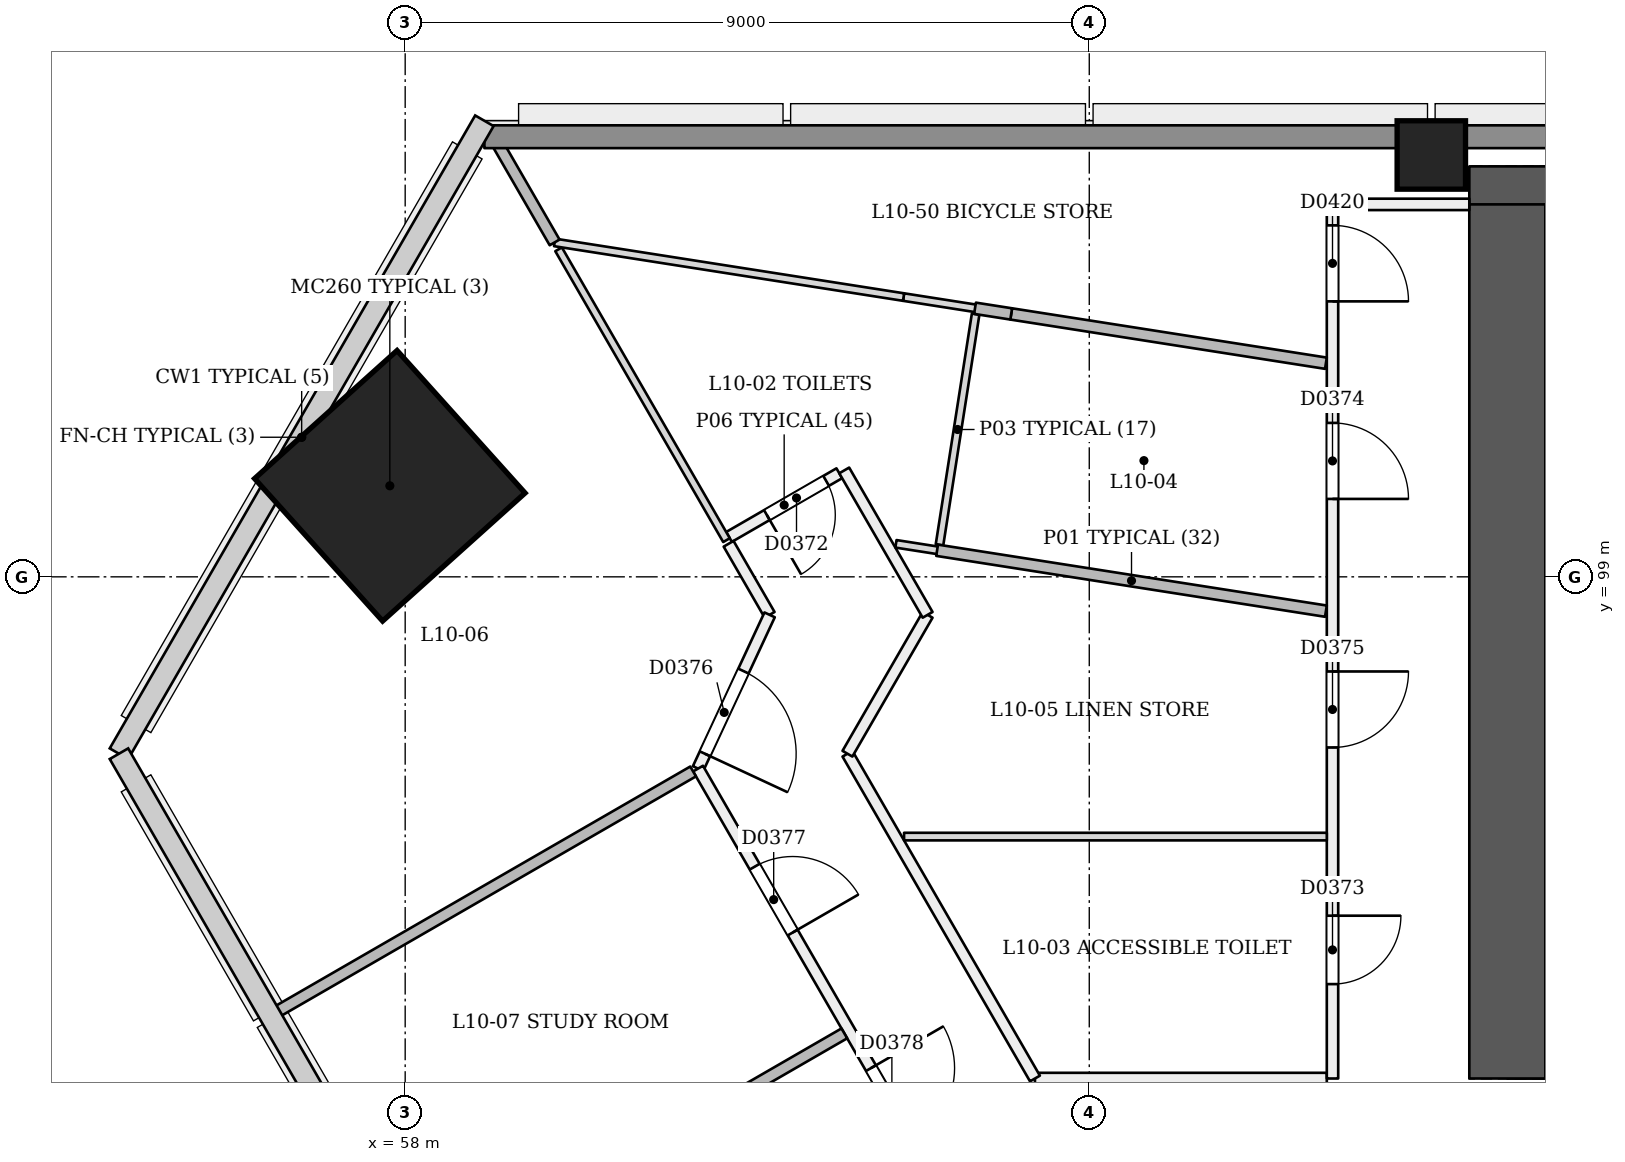
"""IFC4 building model, lengths in metres.
Left out: names, types, materials, properties, quantities, classifications, styles, units other than length and angle.
Written with IfcOpenShell. Run it as: python <this file> out.ifc"""

import sys

from ifc_helpers import new_model, si_unit, direction, frame, frame_2d, origin, origin_2d, place, context, subcontext, project, spatial, rectangle, extrude, element, fill, save


model = new_model("IFC4")
c1 = context("Model", 3, precision=1e-05, world=origin(), true_north=direction((0.0, 1.0)))
c2 = subcontext(c1, "Body", "Model", "MODEL_VIEW")
j1 = project(units=[si_unit("LENGTHUNIT", "METRE"), si_unit("PLANEANGLEUNIT", "RADIAN")], contexts=[c1])
p1 = place(None, origin())
s1 = spatial("IfcSite", under=j1, at=p1, CompositionType="ELEMENT")
p2 = place(p1, origin())
s2 = spatial("IfcBuilding", under=s1, at=p2, CompositionType="ELEMENT")
p3 = place(p2, frame((0.0, 0.0, 45.0)))
s3 = spatial("IfcBuildingStorey", under=s2, at=p3, CompositionType="ELEMENT", Elevation=45.0)
p4 = place(p3, frame((72.5, 92.9, 0.0), z_axis=(0.0, 0.0, 1.0), x_axis=(1.0, 0.0, 0.0)))
e1 = element("IfcWall", 1, at=p4, inside=s3, PredefinedType="SHEAR", context=c2, shape_type="SweptSolid", body=[
    extrude(rectangle(XDim=25.5, YDim=1.0, at=frame_2d((12.75, 0.0))), origin(), (0.0, 0.0, 1.0), 3.6),
])
p5 = place(p4, frame((1.3, 0.0, 0.0)))
e2 = element("IfcOpeningElement", 2, at=p5, cuts=e1, PredefinedType="OPENING", context=c2, shape_type="SweptSolid", body=[
    extrude(rectangle(XDim=1.2, YDim=2.1, at=frame_2d((0.6, 1.05))), frame((0.0, 0.51, 0.0), z_axis=(0.0, -1.0, 0.0), x_axis=(1.0, 0.0, 0.0)), (0.0, 0.0, 1.0), 1.021),
])
p6 = place(p4, frame((3.5, 0.0, 0.0)))
e3 = element("IfcOpeningElement", 3, at=p6, cuts=e1, PredefinedType="OPENING", context=c2, shape_type="SweptSolid", body=[
    extrude(rectangle(XDim=1.2, YDim=2.1, at=frame_2d((0.6, 1.05))), frame((0.0, 0.51, 0.0), z_axis=(0.0, -1.0, 0.0), x_axis=(1.0, 0.0, 0.0)), (0.0, 0.0, 1.0), 1.021),
])
p7 = place(p4, frame((13.5, 0.0, 0.0)))
e4 = element("IfcOpeningElement", 4, at=p7, cuts=e1, PredefinedType="OPENING", context=c2, shape_type="SweptSolid", body=[
    extrude(rectangle(XDim=1.2, YDim=2.1, at=frame_2d((0.6, 1.05))), frame((0.0, 0.51, 0.0), z_axis=(0.0, -1.0, 0.0), x_axis=(1.0, 0.0, 0.0)), (0.0, 0.0, 1.0), 1.021),
])
p8 = place(p4, frame((16.913, 0.0, 0.0)))
e5 = element("IfcOpeningElement", 5, at=p8, cuts=e1, PredefinedType="OPENING", context=c2, shape_type="SweptSolid", body=[
    extrude(rectangle(XDim=1.0, YDim=2.1, at=frame_2d((0.5, 1.05))), frame((0.0, 0.51, 0.0), z_axis=(0.0, -1.0, 0.0), x_axis=(1.0, 0.0, 0.0)), (0.0, 0.0, 1.0), 1.021),
])
p9 = place(p4, frame((20.8, 0.0, 0.0)))
e6 = element("IfcOpeningElement", 6, at=p9, cuts=e1, PredefinedType="OPENING", context=c2, shape_type="SweptSolid", body=[
    extrude(rectangle(XDim=1.0, YDim=2.1, at=frame_2d((0.5, 1.05))), frame((0.0, 0.51, 0.0), z_axis=(0.0, -1.0, 0.0), x_axis=(1.0, 0.0, 0.0)), (0.0, 0.0, 1.0), 1.021),
])
p10 = place(p4, frame((23.238, 0.0, 0.0)))
e7 = element("IfcOpeningElement", 7, at=p10, cuts=e1, PredefinedType="OPENING", context=c2, shape_type="SweptSolid", body=[
    extrude(rectangle(XDim=1.0, YDim=2.1, at=frame_2d((0.5, 1.05))), frame((0.0, 0.51, 0.0), z_axis=(0.0, -1.0, 0.0), x_axis=(1.0, 0.0, 0.0)), (0.0, 0.0, 1.0), 1.021),
])
p11 = place(p3, frame((97.5, 103.9, 0.0), z_axis=(0.0, 0.0, 1.0), x_axis=(-1.0, 0.0, 0.0)))
e8 = element("IfcWall", 8, at=p11, inside=s3, PredefinedType="SHEAR", context=c2, shape_type="SweptSolid", body=[
    extrude(rectangle(XDim=25.5, YDim=1.0, at=frame_2d((12.75, 0.0))), origin(), (0.0, 0.0, 1.0), 3.6),
])
p12 = place(p3, frame((72.5, 103.9, 0.0), z_axis=(0.0, 0.0, 1.0), x_axis=(0.0, -1.0, 0.0)))
e9 = element("IfcWall", 9, at=p12, inside=s3, PredefinedType="SHEAR", context=c2, shape_type="SweptSolid", body=[
    extrude(rectangle(XDim=11.5, YDim=1.0, at=frame_2d((5.75, 0.0))), origin(), (0.0, 0.0, 1.0), 3.6),
])
p13 = place(p3, frame((57.764, 100.187, 0.0), z_axis=(0.028401814599, 0.009218727412, 0.999554076572), x_axis=(-0.865122998738, 0.501162448814, 0.019959883591)))
e10 = element("IfcColumn", 10, at=p13, inside=s3, PredefinedType="COLUMN", context=c2, shape_type="SweptSolid", body=[
    extrude(rectangle(XDim=2.52, YDim=2.52, at=origin_2d()), origin(), (0.0, 0.0, 1.0), 3.602),
])
p14 = place(p3, frame((71.5, 104.55, 0.0), z_axis=(0.0, 0.0, 1.0), x_axis=(1.0, 0.0, 0.0)))
e11 = element("IfcColumn", 11, at=p14, inside=s3, PredefinedType="COLUMN", context=c2, shape_type="SweptSolid", body=[
    extrude(rectangle(XDim=0.9, YDim=0.9, at=origin_2d()), origin(), (0.0, 0.0, 1.0), 3.6),
])
p15 = place(p3, frame((63.711, 100.363, 0.0), z_axis=(0.0, 0.0, 1.0), x_axis=(-0.865964676353, -0.500105168249, 0.0)))
e12 = element("IfcWall", 12, at=p15, inside=s3, PredefinedType="PARTITIONING", context=c2, shape_type="SweptSolid", body=[
    extrude(rectangle(XDim=1.675, YDim=0.15, at=frame_2d((0.837, 0.0))), origin(), (0.0, 0.0, 1.0), 3.1),
])
p16 = place(p15, frame((0.2, 0.0, 0.0)))
e13 = element("IfcOpeningElement", 13, at=p16, cuts=e12, PredefinedType="OPENING", context=c2, shape_type="SweptSolid", body=[
    extrude(rectangle(XDim=0.9, YDim=2.1, at=frame_2d((0.45, 1.05))), frame((0.0, 0.085, 0.0), z_axis=(0.0, -1.0, 0.0), x_axis=(1.0, 0.0, 0.0)), (0.0, 0.0, 1.0), 0.171),
])
p17 = place(p3, frame((70.125, 92.4, 0.0), z_axis=(0.0, 0.0, 1.0), x_axis=(-1.0, 0.0, 0.0)))
e14 = element("IfcWall", 14, at=p17, inside=s3, PredefinedType="PARTITIONING", context=c2, shape_type="SweptSolid", body=[
    extrude(rectangle(XDim=3.84, YDim=0.15, at=frame_2d((1.92, 0.0))), origin(), (0.0, 0.0, 1.0), 3.1),
])
p18 = place(p3, frame((66.285, 92.4, 0.0), z_axis=(0.0, 0.0, 1.0), x_axis=(-0.499986575203, 0.866033154456, 0.0)))
e15 = element("IfcWall", 15, at=p18, inside=s3, PredefinedType="PARTITIONING", context=c2, shape_type="SweptSolid", body=[
    extrude(rectangle(XDim=4.934, YDim=0.15, at=frame_2d((2.467, 0.0))), origin(), (0.0, 0.0, 1.0), 3.1),
])
p19 = place(p3, frame((70.2, 103.9, 0.0), z_axis=(0.0, 0.0, 1.0), x_axis=(0.0, -1.0, 0.0)))
e16 = element("IfcWall", 16, at=p19, inside=s3, PredefinedType="PARTITIONING", context=c2, shape_type="SweptSolid", body=[
    extrude(rectangle(XDim=11.5, YDim=0.15, at=frame_2d((5.75, 0.0))), origin(), (0.0, 0.0, 1.0), 2.6),
])
p20 = place(p19, frame((9.358, 0.0, 0.0)))
e17 = element("IfcOpeningElement", 17, at=p20, cuts=e16, PredefinedType="OPENING", context=c2, shape_type="SweptSolid", body=[
    extrude(rectangle(XDim=0.9, YDim=2.1, at=frame_2d((0.45, 1.05))), frame((0.0, 0.085, 0.0), z_axis=(0.0, -1.0, 0.0), x_axis=(1.0, 0.0, 0.0)), (0.0, 0.0, 1.0), 0.171),
])
p21 = place(p19, frame((2.875, 0.0, 0.0)))
e18 = element("IfcOpeningElement", 18, at=p21, cuts=e16, PredefinedType="OPENING", context=c2, shape_type="SweptSolid", body=[
    extrude(rectangle(XDim=1.0, YDim=2.1, at=frame_2d((0.5, 1.05))), frame((0.0, 0.085, 0.0), z_axis=(0.0, -1.0, 0.0), x_axis=(1.0, 0.0, 0.0)), (0.0, 0.0, 1.0), 0.171),
])
p22 = place(p19, frame((6.145, 0.0, 0.0)))
e19 = element("IfcOpeningElement", 19, at=p22, cuts=e16, PredefinedType="OPENING", context=c2, shape_type="SweptSolid", body=[
    extrude(rectangle(XDim=1.0, YDim=2.1, at=frame_2d((0.5, 1.05))), frame((0.0, 0.085, 0.0), z_axis=(0.0, -1.0, 0.0), x_axis=(1.0, 0.0, 0.0)), (0.0, 0.0, 1.0), 0.171),
])
p23 = place(p19, frame((0.276, 0.0, 0.0)))
e20 = element("IfcOpeningElement", 20, at=p23, cuts=e16, PredefinedType="OPENING", context=c2, shape_type="SweptSolid", body=[
    extrude(rectangle(XDim=1.0, YDim=2.1, at=frame_2d((0.5, 1.05))), frame((0.0, 0.085, 0.0), z_axis=(0.0, -1.0, 0.0), x_axis=(1.0, 0.0, 0.0)), (0.0, 0.0, 1.0), 0.171),
])
p24 = place(p3, frame((63.818, 96.673, 0.0), z_axis=(0.0, 0.0, 1.0), x_axis=(0.500059708758, 0.865990928173, 0.0)))
e21 = element("IfcWall", 21, at=p24, inside=s3, PredefinedType="PARTITIONING", context=c2, shape_type="SweptSolid", body=[
    extrude(rectangle(XDim=2.11, YDim=0.15, at=frame_2d((1.055, 0.0))), origin(), (0.0, 0.0, 1.0), 3.1),
])
p25 = place(p3, frame((64.873, 98.5, 0.0), z_axis=(0.0, 0.0, 1.0), x_axis=(-0.500005024956, 0.866022502605, 0.0)))
e22 = element("IfcWall", 22, at=p25, inside=s3, PredefinedType="PARTITIONING", context=c2, shape_type="SweptSolid", body=[
    extrude(rectangle(XDim=2.194, YDim=0.15, at=frame_2d((1.097, 0.0))), origin(), (0.0, 0.0, 1.0), 3.1),
])
p26 = place(p3, frame((62.255, 99.435, 0.0), z_axis=(0.0, 0.0, 1.0), x_axis=(0.499957341738, -0.866050031143, 0.0)))
e23 = element("IfcWall", 23, at=p26, inside=s3, PredefinedType="PARTITIONING", context=c2, shape_type="SweptSolid", body=[
    extrude(rectangle(XDim=1.08, YDim=0.15, at=frame_2d((0.54, 0.0))), origin(), (0.0, 0.0, 1.0), 3.1),
])
p27 = place(p3, frame((62.795, 98.5, 0.0), z_axis=(0.0, 0.0, 1.0), x_axis=(-0.422004773016, -0.906593608819, 0.0)))
e24 = element("IfcWall", 24, at=p27, inside=s3, PredefinedType="PARTITIONING", context=c2, shape_type="SweptSolid", body=[
    extrude(rectangle(XDim=2.231, YDim=0.15, at=frame_2d((1.116, 0.0))), origin(), (0.0, 0.0, 1.0), 3.1),
])
p28 = place(p27, frame((0.816, 0.0, 0.0)))
e25 = element("IfcOpeningElement", 25, at=p28, cuts=e24, PredefinedType="OPENING", context=c2, shape_type="SweptSolid", body=[
    extrude(rectangle(XDim=1.2, YDim=2.1, at=frame_2d((0.6, 1.05))), frame((0.0, 0.085, 0.0), z_axis=(0.0, -1.0, 0.0), x_axis=(1.0, 0.0, 0.0)), (0.0, 0.0, 1.0), 0.171),
])
p29 = place(p3, frame((61.853, 96.477, 0.0), z_axis=(0.0, 0.0, 1.0), x_axis=(0.500000327816, -0.86602521452, 0.0)))
e26 = element("IfcWall", 26, at=p29, inside=s3, PredefinedType="PARTITIONING", context=c2, shape_type="SweptSolid", body=[
    extrude(rectangle(XDim=39.979, YDim=0.15, at=frame_2d((19.99, 0.0))), origin(), (0.0, 0.0, 1.0), 2.7),
])
p30 = place(p29, frame((1.49, 0.0, 0.0)))
e27 = element("IfcOpeningElement", 27, at=p30, cuts=e26, PredefinedType="OPENING", context=c2, shape_type="SweptSolid", body=[
    extrude(rectangle(XDim=1.0, YDim=2.1, at=frame_2d((0.5, 1.05))), frame((0.0, 0.085, 0.0), z_axis=(0.0, -1.0, 0.0), x_axis=(1.0, 0.0, 0.0)), (0.0, 0.0, 1.0), 0.171),
])
p31 = place(p29, frame((4.55, 0.0, 0.0)))
e28 = element("IfcOpeningElement", 28, at=p31, cuts=e26, PredefinedType="OPENING", context=c2, shape_type="SweptSolid", body=[
    extrude(rectangle(XDim=1.1, YDim=2.1, at=frame_2d((0.55, 1.05))), frame((0.0, 0.085, 0.0), z_axis=(0.0, -1.0, 0.0), x_axis=(1.0, 0.0, 0.0)), (0.0, 0.0, 1.0), 0.171),
])
p32 = place(p29, frame((11.259, 0.0, 0.0)))
e29 = element("IfcOpeningElement", 29, at=p32, cuts=e26, PredefinedType="OPENING", context=c2, shape_type="SweptSolid", body=[
    extrude(rectangle(XDim=1.0, YDim=2.1, at=frame_2d((0.5, 1.05))), frame((0.0, 0.085, 0.0), z_axis=(0.0, -1.0, 0.0), x_axis=(1.0, 0.0, 0.0)), (0.0, 0.0, 1.0), 0.171),
])
p33 = place(p29, frame((17.979, 0.0, 0.0)))
e30 = element("IfcOpeningElement", 30, at=p33, cuts=e26, PredefinedType="OPENING", context=c2, shape_type="SweptSolid", body=[
    extrude(rectangle(XDim=1.2, YDim=2.1, at=frame_2d((0.6, 1.05))), frame((0.0, 0.085, 0.0), z_axis=(0.0, -1.0, 0.0), x_axis=(1.0, 0.0, 0.0)), (0.0, 0.0, 1.0), 0.171),
])
p34 = place(p29, frame((22.699, 0.0, 0.0)))
e31 = element("IfcOpeningElement", 31, at=p34, cuts=e26, PredefinedType="OPENING", context=c2, shape_type="SweptSolid", body=[
    extrude(rectangle(XDim=1.0, YDim=2.1, at=frame_2d((0.5, 1.05))), frame((0.0, 0.085, 0.0), z_axis=(0.0, -1.0, 0.0), x_axis=(1.0, 0.0, 0.0)), (0.0, 0.0, 1.0), 0.171),
])
p35 = place(p29, frame((29.374, 0.0, 0.0)))
e32 = element("IfcOpeningElement", 32, at=p35, cuts=e26, PredefinedType="OPENING", context=c2, shape_type="SweptSolid", body=[
    extrude(rectangle(XDim=1.0, YDim=2.1, at=frame_2d((0.5, 1.05))), frame((0.0, 0.085, 0.0), z_axis=(0.0, -1.0, 0.0), x_axis=(1.0, 0.0, 0.0)), (0.0, 0.0, 1.0), 0.171),
])
p36 = place(p29, frame((31.584, 0.0, 0.0)))
e33 = element("IfcOpeningElement", 33, at=p36, cuts=e26, PredefinedType="OPENING", context=c2, shape_type="SweptSolid", body=[
    extrude(rectangle(XDim=1.0, YDim=2.1, at=frame_2d((0.5, 1.05))), frame((0.0, 0.085, 0.0), z_axis=(0.0, -1.0, 0.0), x_axis=(1.0, 0.0, 0.0)), (0.0, 0.0, 1.0), 0.171),
])
p37 = place(p29, frame((38.374, 0.0, 0.0)))
e34 = element("IfcOpeningElement", 34, at=p37, cuts=e26, PredefinedType="OPENING", context=c2, shape_type="SweptSolid", body=[
    extrude(rectangle(XDim=1.0, YDim=2.1, at=frame_2d((0.5, 1.05))), frame((0.0, 0.085, 0.0), z_axis=(0.0, -1.0, 0.0), x_axis=(1.0, 0.0, 0.0)), (0.0, 0.0, 1.0), 0.171),
])
p38 = place(p3, frame((72.0, 103.9, 0.0), z_axis=(0.0, 0.0, 1.0), x_axis=(-1.0, 0.0, 0.0)))
e35 = element("IfcWall", 35, at=p38, inside=s3, PredefinedType="PARTITIONING", context=c2, shape_type="SweptSolid", body=[
    extrude(rectangle(XDim=1.725, YDim=0.15, at=frame_2d((0.863, 0.0))), origin(), (0.0, 0.0, 1.0), 2.6),
])
p39 = place(p3, frame((65.03, 99.421, 0.0), z_axis=(0.0, 0.0, 1.0), x_axis=(0.154701666179, 0.987961231264, 0.0)))
e36 = element("IfcWall", 36, at=p39, inside=s3, PredefinedType="PARTITIONING", context=c2, shape_type="SweptSolid", body=[
    extrude(rectangle(XDim=3.073, YDim=0.1, at=frame_2d((1.536, 0.0))), origin(), (0.0, 0.0, 1.0), 2.6),
])
p40 = place(p3, frame((64.457, 99.434, 0.0), z_axis=(0.0, 0.0, 1.0), x_axis=(0.988004117719, -0.154427534366, 0.0)))
e37 = element("IfcWall", 37, at=p40, inside=s3, PredefinedType="PARTITIONING", context=c2, shape_type="SweptSolid", body=[
    extrude(rectangle(XDim=0.588, YDim=0.1, at=frame_2d((0.294, 0.0))), origin(), (0.0, 0.0, 1.0), 3.1),
])
p41 = place(p3, frame((60.018, 103.309, 0.0), z_axis=(0.0, 0.0, 1.0), x_axis=(0.499966399055, -0.86604480243, 0.0)))
e38 = element("IfcWall", 38, at=p41, inside=s3, PredefinedType="PARTITIONING", context=c2, shape_type="SweptSolid", body=[
    extrude(rectangle(XDim=4.418, YDim=0.1, at=frame_2d((2.209, 0.0))), origin(), (0.0, 0.0, 1.0), 2.6),
])
p42 = place(p3, frame((65.536, 102.527, 0.0), z_axis=(0.0, 0.0, 1.0), x_axis=(-0.987969741582, 0.154647307506, 0.0)))
e39 = element("IfcWall", 39, at=p42, inside=s3, PredefinedType="PARTITIONING", context=c2, shape_type="SweptSolid", body=[
    extrude(rectangle(XDim=0.991, YDim=0.1, at=frame_2d((0.496, 0.0))), origin(), (0.0, 0.0, 1.0), 2.6),
])
p43 = place(p3, frame((64.557, 102.681, 0.0), z_axis=(0.0, 0.0, 1.0), x_axis=(-0.987956876752, 0.154729472561, 0.0)))
e40 = element("IfcWall", 40, at=p43, inside=s3, PredefinedType="PARTITIONING", context=c2, shape_type="SweptSolid", body=[
    extrude(rectangle(XDim=4.647, YDim=0.1, at=frame_2d((2.323, 0.0))), origin(), (0.0, 0.0, 1.0), 3.1),
])
p44 = place(p3, frame((70.125, 95.583, 0.0), z_axis=(0.0, 0.0, 1.0), x_axis=(-1.0, 0.0, 0.0)))
e41 = element("IfcWall", 41, at=p44, inside=s3, PredefinedType="PARTITIONING", context=c2, shape_type="SweptSolid", body=[
    extrude(rectangle(XDim=5.562, YDim=0.1, at=frame_2d((2.781, 0.0))), origin(), (0.0, 0.0, 1.0), 3.1),
])
p45 = place(p3, frame((64.998, 99.35, 0.0), z_axis=(0.0, 0.0, 1.0), x_axis=(0.987958705643, -0.154717794531, 0.0)))
e42 = element("IfcWall", 42, at=p45, inside=s3, PredefinedType="PARTITIONING", context=c2, shape_type="SweptSolid", body=[
    extrude(rectangle(XDim=5.177, YDim=0.15, at=frame_2d((2.589, 0.0))), origin(), (0.0, 0.0, 1.0), 3.1),
])
p46 = place(p3, frame((70.113, 101.81, 0.0), z_axis=(0.0, 0.0, 1.0), x_axis=(-0.987957270298, 0.154726959721, 0.0)))
e43 = element("IfcWall", 43, at=p46, inside=s3, PredefinedType="PARTITIONING", context=c2, shape_type="SweptSolid", body=[
    extrude(rectangle(XDim=4.191, YDim=0.15, at=frame_2d((2.095, 0.0))), origin(), (0.0, 0.0, 1.0), 3.1),
])
p47 = place(p3, frame((65.973, 102.459, 0.0), z_axis=(0.0, 0.0, 1.0), x_axis=(-0.9879103998, 0.155025939661, 0.0)))
e44 = element("IfcWall", 44, at=p47, inside=s3, PredefinedType="PARTITIONING", context=c2, shape_type="SweptSolid", body=[
    extrude(rectangle(XDim=0.482, YDim=0.15, at=frame_2d((0.241, 0.0))), origin(), (0.0, 0.0, 1.0), 2.6),
])
p48 = place(p3, frame((56.293, 93.267, 0.0), z_axis=(0.0, 0.0, 1.0), x_axis=(0.866025401434, 0.500000004071, 0.0)))
e45 = element("IfcWall", 45, at=p48, inside=s3, PredefinedType="PARTITIONING", context=c2, shape_type="SweptSolid", body=[
    extrude(rectangle(XDim=6.345, YDim=0.15, at=frame_2d((3.173, 0.0))), origin(), (0.0, 0.0, 1.0), 2.6),
])
p49 = place(p3, frame((59.966, 103.4, 0.0), z_axis=(0.0, 0.0, 1.0), x_axis=(-0.500124983322, 0.865953232604, 0.0)))
e46 = element("IfcWall", 46, at=p49, inside=s3, PredefinedType="PARTITIONING", context=c2, shape_type="SweptSolid", body=[
    extrude(rectangle(XDim=1.732, YDim=0.15, at=frame_2d((0.866, 0.0))), origin(), (0.0, 0.0, 1.0), 3.1),
])
p50 = place(p3, frame((58.282, 89.821, 0.0), z_axis=(0.0, 0.0, 1.0), x_axis=(0.866025401434, 0.500000004071, 0.0)))
e47 = element("IfcWall", 47, at=p50, inside=s3, PredefinedType="PARTITIONING", context=c2, shape_type="SweptSolid", body=[
    extrude(rectangle(XDim=6.345, YDim=0.15, at=frame_2d((3.173, 0.0))), origin(), (0.0, 0.0, 1.0), 2.6),
])
p51 = place(p3, frame((59.042, 104.79, 0.0), z_axis=(0.0, 0.0, 1.0), x_axis=(1.0, 0.0, 0.0)))
e48 = element("IfcWall", 48, at=p51, inside=s3, PredefinedType="SOLIDWALL", context=c2, shape_type="SweptSolid", body=[
    extrude(rectangle(XDim=51.916, YDim=0.3, at=frame_2d((25.958, 0.0))), origin(), (0.0, 0.0, 1.0), 2.6),
])
p52 = place(p16, origin())
e49 = element("IfcDoor", 49, at=p52, inside=s3, OperationType="SINGLE_SWING_RIGHT", PredefinedType="NOTDEFINED", context=c2, shape_type="SweptSolid", body=[
    extrude(rectangle(XDim=0.9, YDim=2.1, at=frame_2d((0.45, 1.05))), frame((0.0, 0.025, 0.0), z_axis=(0.0, -1.0, 0.0), x_axis=(1.0, 0.0, 0.0)), (0.0, 0.0, 1.0), 0.05),
])
fill(e13, e49)
p53 = place(p20, origin())
e50 = element("IfcDoor", 50, at=p53, inside=s3, OperationType="SINGLE_SWING_LEFT", PredefinedType="NOTDEFINED", context=c2, shape_type="SweptSolid", body=[
    extrude(rectangle(XDim=0.9, YDim=2.1, at=frame_2d((0.45, 1.05))), frame((0.0, 0.025, 0.0), z_axis=(0.0, -1.0, 0.0), x_axis=(1.0, 0.0, 0.0)), (0.0, 0.0, 1.0), 0.05),
])
fill(e17, e50)
p54 = place(p21, origin())
e51 = element("IfcDoor", 51, at=p54, inside=s3, OperationType="SINGLE_SWING_RIGHT", PredefinedType="NOTDEFINED", context=c2, shape_type="SweptSolid", body=[
    extrude(rectangle(XDim=1.0, YDim=2.1, at=frame_2d((0.5, 1.05))), frame((0.0, 0.025, 0.0), z_axis=(0.0, -1.0, 0.0), x_axis=(1.0, 0.0, 0.0)), (0.0, 0.0, 1.0), 0.05),
])
fill(e18, e51)
p55 = place(p22, origin())
e52 = element("IfcDoor", 52, at=p55, inside=s3, OperationType="SINGLE_SWING_LEFT", PredefinedType="NOTDEFINED", context=c2, shape_type="SweptSolid", body=[
    extrude(rectangle(XDim=1.0, YDim=2.1, at=frame_2d((0.5, 1.05))), frame((0.0, 0.025, 0.0), z_axis=(0.0, -1.0, 0.0), x_axis=(1.0, 0.0, 0.0)), (0.0, 0.0, 1.0), 0.05),
])
fill(e19, e52)
p56 = place(p28, origin())
e53 = element("IfcDoor", 53, at=p56, inside=s3, OperationType="SINGLE_SWING_RIGHT", PredefinedType="NOTDEFINED", context=c2, shape_type="SweptSolid", body=[
    extrude(rectangle(XDim=1.2, YDim=2.1, at=frame_2d((0.6, 1.05))), frame((0.0, 0.025, 0.0), z_axis=(0.0, -1.0, 0.0), x_axis=(1.0, 0.0, 0.0)), (0.0, 0.0, 1.0), 0.05),
])
fill(e25, e53)
p57 = place(p30, origin())
e54 = element("IfcDoor", 54, at=p57, inside=s3, OperationType="SINGLE_SWING_RIGHT", PredefinedType="NOTDEFINED", context=c2, shape_type="SweptSolid", body=[
    extrude(rectangle(XDim=1.0, YDim=2.1, at=frame_2d((0.5, 1.05))), frame((0.0, 0.025, 0.0), z_axis=(0.0, -1.0, 0.0), x_axis=(1.0, 0.0, 0.0)), (0.0, 0.0, 1.0), 0.05),
])
fill(e27, e54)
p58 = place(p31, origin())
e55 = element("IfcDoor", 55, at=p58, inside=s3, OperationType="SINGLE_SWING_LEFT", PredefinedType="NOTDEFINED", context=c2, shape_type="SweptSolid", body=[
    extrude(rectangle(XDim=1.1, YDim=2.1, at=frame_2d((0.55, 1.05))), frame((0.0, 0.025, 0.0), z_axis=(0.0, -1.0, 0.0), x_axis=(1.0, 0.0, 0.0)), (0.0, 0.0, 1.0), 0.05),
])
fill(e28, e55)
p59 = place(p23, origin())
e56 = element("IfcDoor", 56, at=p59, inside=s3, OperationType="SINGLE_SWING_RIGHT", PredefinedType="NOTDEFINED", context=c2, shape_type="SweptSolid", body=[
    extrude(rectangle(XDim=1.0, YDim=2.1, at=frame_2d((0.5, 1.05))), frame((0.0, 0.025, 0.0), z_axis=(0.0, -1.0, 0.0), x_axis=(1.0, 0.0, 0.0)), (0.0, 0.0, 1.0), 0.05),
])
fill(e20, e56)
save(model, sys.argv[1])
